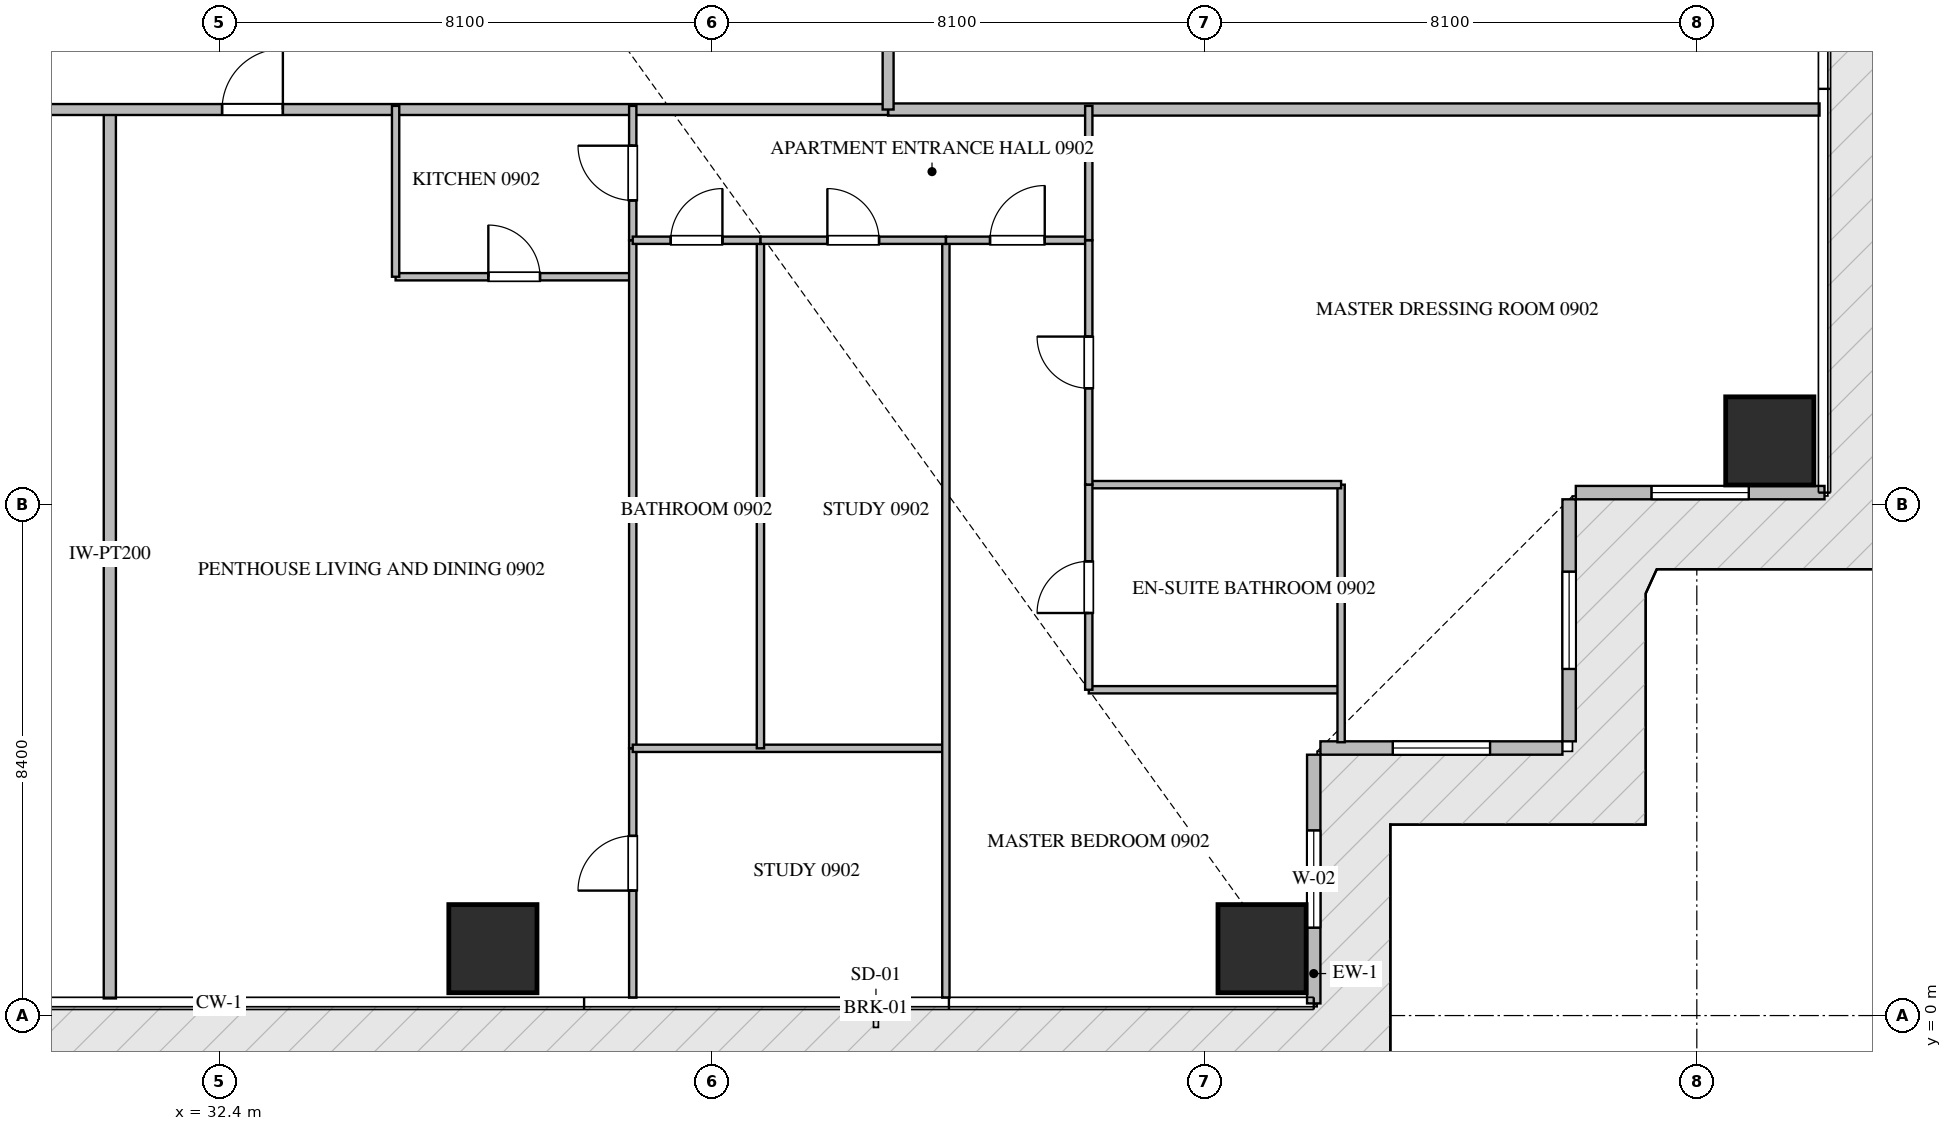
"""IFC4 building model, lengths in metres.
Left out: names, types, materials, properties, quantities, classifications, styles, units other than length and angle.
Written with IfcOpenShell. Run it as: python <this file> out.ifc"""

import sys

from ifc_helpers import new_model, si_unit, direction, frame, frame_2d, origin, origin_2d, place, context, subcontext, project, spatial, rectangle, extrude, source, transform, mapped, element, fill, save


model = new_model("IFC4")
c1 = context("Model", 3, precision=1e-05, world=origin(), true_north=direction((0.0, 1.0)))
c2 = subcontext(c1, "Body", "Model", "MODEL_VIEW")
j1 = project(units=[si_unit("LENGTHUNIT", "METRE"), si_unit("PLANEANGLEUNIT", "RADIAN")], contexts=[c1])
p1 = place(None, origin())
s1 = spatial("IfcSite", under=j1, at=p1, CompositionType="ELEMENT")
p2 = place(p1, origin())
s2 = spatial("IfcBuilding", under=s1, at=p2, CompositionType="ELEMENT")
p3 = place(p2, frame((0.0, 0.0, 41.7)))
s3 = spatial("IfcBuildingStorey", under=s2, at=p3, CompositionType="ELEMENT", Elevation=41.7)
m1 = source(origin(), c2, "Body", "SweptSolid", [
    extrude(rectangle(XDim=1.45, YDim=1.45, at=origin_2d()), origin(), (0.0, 0.0, 1.0), 3.75),
])
for number, where, z_axis, x_axis in (
    (1, (36.9, 1.1, -0.26), (0.0, 0.0, 1.0), (1.0, 0.0, 0.0)),
    (2, (49.55, 1.1, -0.26), (0.0, 0.0, 1.0), (1.0, 0.0, 0.0)),
    (3, (57.9, 9.45, -0.26), (0.0, 0.0, 1.0), (1.0, 0.0, 0.0)),
):
    element("IfcColumn", number, at=place(p3, frame(where, z_axis=z_axis, x_axis=x_axis)), inside=s3, PredefinedType="COLUMN", context=c2, shape_type="MappedRepresentation", body=[
        mapped(m1, transform((0.0, 0.0, 0.0), scale=1.0)),
    ])
p4 = place(p3, frame((50.4, 0.2, 0.0), z_axis=(0.0, 0.0, 1.0), x_axis=(0.0, 1.0, 0.0)))
e4 = element("IfcWall", 4, at=p4, inside=s3, PredefinedType="ELEMENTEDWALL", context=c2, shape_type="SweptSolid", body=[
    extrude(rectangle(XDim=4.09, YDim=0.22, at=frame_2d((2.045, 0.0))), origin(), (0.0, 0.0, 1.0), 3.475),
])
p5 = place(p4, frame((1.245, 0.0, 0.65)))
e5 = element("IfcOpeningElement", 5, at=p5, cuts=e4, PredefinedType="OPENING", context=c2, shape_type="SweptSolid", body=[
    extrude(rectangle(XDim=1.6, YDim=2.1, at=frame_2d((0.8, 1.05))), frame((0.0, 0.12, 0.0), z_axis=(0.0, -1.0, 0.0), x_axis=(1.0, 0.0, 0.0)), (0.0, 0.0, 1.0), 0.24),
])
p6 = place(p3, frame((50.51, 4.4, 0.0), z_axis=(0.0, 0.0, 1.0), x_axis=(1.0, 0.0, 0.0)))
e6 = element("IfcWall", 6, at=p6, inside=s3, PredefinedType="ELEMENTEDWALL", context=c2, shape_type="SweptSolid", body=[
    extrude(rectangle(XDim=3.98, YDim=0.22, at=frame_2d((1.99, 0.0))), origin(), (0.0, 0.0, 1.0), 3.475),
])
p7 = place(p6, frame((1.19, 0.0, 0.65)))
e7 = element("IfcOpeningElement", 7, at=p7, cuts=e6, PredefinedType="OPENING", context=c2, shape_type="SweptSolid", body=[
    extrude(rectangle(XDim=1.6, YDim=2.1, at=frame_2d((0.8, 1.05))), frame((0.0, 0.12, 0.0), z_axis=(0.0, -1.0, 0.0), x_axis=(1.0, 0.0, 0.0)), (0.0, 0.0, 1.0), 0.24),
])
p8 = place(p3, frame((54.6, 4.51, 0.0), z_axis=(0.0, 0.0, 1.0), x_axis=(0.0, 1.0, 0.0)))
e8 = element("IfcWall", 8, at=p8, inside=s3, PredefinedType="ELEMENTEDWALL", context=c2, shape_type="SweptSolid", body=[
    extrude(rectangle(XDim=3.98, YDim=0.22, at=frame_2d((1.99, 0.0))), origin(), (0.0, 0.0, 1.0), 3.475),
])
p9 = place(p8, frame((1.19, 0.0, 0.65)))
e9 = element("IfcOpeningElement", 9, at=p9, cuts=e8, PredefinedType="OPENING", context=c2, shape_type="SweptSolid", body=[
    extrude(rectangle(XDim=1.6, YDim=2.1, at=frame_2d((0.8, 1.05))), frame((0.0, 0.12, 0.0), z_axis=(0.0, -1.0, 0.0), x_axis=(1.0, 0.0, 0.0)), (0.0, 0.0, 1.0), 0.24),
])
p10 = place(p3, frame((54.71, 8.6, 0.0), z_axis=(0.0, 0.0, 1.0), x_axis=(1.0, 0.0, 0.0)))
e10 = element("IfcWall", 10, at=p10, inside=s3, PredefinedType="ELEMENTEDWALL", context=c2, shape_type="SweptSolid", body=[
    extrude(rectangle(XDim=4.09, YDim=0.22, at=frame_2d((2.045, 0.0))), origin(), (0.0, 0.0, 1.0), 3.475),
])
p11 = place(p10, frame((1.245, 0.0, 0.65)))
e11 = element("IfcOpeningElement", 11, at=p11, cuts=e10, PredefinedType="OPENING", context=c2, shape_type="SweptSolid", body=[
    extrude(rectangle(XDim=1.6, YDim=2.1, at=frame_2d((0.8, 1.05))), frame((0.0, 0.12, 0.0), z_axis=(0.0, -1.0, 0.0), x_axis=(1.0, 0.0, 0.0)), (0.0, 0.0, 1.0), 0.24),
])
p12 = place(p3, frame((30.6, 0.282, 0.0), z_axis=(0.0, 0.0, 1.0), x_axis=(0.0, 1.0, 0.0)))
e12 = element("IfcWall", 12, at=p12, inside=s3, PredefinedType="PARTITIONING", context=c2, shape_type="SweptSolid", body=[
    extrude(rectangle(XDim=14.618, YDim=0.2, at=frame_2d((7.309, 0.0))), origin(), (0.0, 0.0, 1.0), 3.49),
])
p13 = place(p3, frame((43.4, 14.9, 0.0), z_axis=(0.0, 0.0, 1.0), x_axis=(1.0, 0.0, 0.0)))
e13 = element("IfcWall", 13, at=p13, inside=s3, PredefinedType="PARTITIONING", context=c2, shape_type="SweptSolid", body=[
    extrude(rectangle(XDim=15.318, YDim=0.2, at=frame_2d((7.659, 0.0))), origin(), (0.0, 0.0, 1.0), 3.49),
])
p14 = place(p3, frame((21.402, 14.9, 0.0), z_axis=(0.0, 0.0, 1.0), x_axis=(1.0, 0.0, 0.0)))
e14 = element("IfcWall", 14, at=p14, inside=s3, PredefinedType="PARTITIONING", context=c2, shape_type="SweptSolid", body=[
    extrude(rectangle(XDim=21.996, YDim=0.18, at=frame_2d((10.998, 0.0))), origin(), (0.0, 0.0, 1.0), 3.49),
])
p15 = place(p14, frame((5.816, 0.0, 0.0)))
e15 = element("IfcOpeningElement", 15, at=p15, cuts=e14, PredefinedType="OPENING", context=c2, shape_type="SweptSolid", body=[
    extrude(rectangle(XDim=1.0, YDim=2.15, at=frame_2d((0.5, 1.075))), frame((0.0, 0.1, 0.0), z_axis=(0.0, -1.0, 0.0), x_axis=(1.0, 0.0, 0.0)), (0.0, 0.0, 1.0), 0.2),
])
p16 = place(p14, frame((11.044, 0.0, 0.0)))
e16 = element("IfcOpeningElement", 16, at=p16, cuts=e14, PredefinedType="OPENING", context=c2, shape_type="SweptSolid", body=[
    extrude(rectangle(XDim=1.0, YDim=2.15, at=frame_2d((0.5, 1.075))), frame((0.0, 0.1, 0.0), z_axis=(0.0, -1.0, 0.0), x_axis=(1.0, 0.0, 0.0)), (0.0, 0.0, 1.0), 0.2),
])
p17 = place(p3, frame((43.4, 14.9, 0.0), z_axis=(0.0, 0.0, 1.0), x_axis=(0.0, 1.0, 0.0)))
e17 = element("IfcWall", 17, at=p17, inside=s3, PredefinedType="PARTITIONING", context=c2, shape_type="SweptSolid", body=[
    extrude(rectangle(XDim=20.6, YDim=0.18, at=frame_2d((10.3, 0.0))), origin(), (0.0, 0.0, 1.0), 3.49),
])
p18 = place(p17, frame((1.96, 0.0, 0.0)))
e18 = element("IfcOpeningElement", 18, at=p18, cuts=e17, PredefinedType="OPENING", context=c2, shape_type="SweptSolid", body=[
    extrude(rectangle(XDim=1.0, YDim=2.15, at=frame_2d((0.5, 1.075))), frame((0.0, 0.1, 0.0), z_axis=(0.0, -1.0, 0.0), x_axis=(1.0, 0.0, 0.0)), (0.0, 0.0, 1.0), 0.2),
])
p19 = place(p3, frame((35.3, 12.15, 0.0), z_axis=(0.0, 0.0, 1.0), x_axis=(1.0, 0.0, 0.0)))
e19 = element("IfcWall", 19, at=p19, inside=s3, PredefinedType="PARTITIONING", context=c2, shape_type="SweptSolid", body=[
    extrude(rectangle(XDim=3.9, YDim=0.12, at=frame_2d((1.95, 0.0))), origin(), (0.0, 0.0, 1.0), 3.49),
])
p20 = place(p19, frame((1.525, 0.0, 0.0)))
e20 = element("IfcOpeningElement", 20, at=p20, cuts=e19, PredefinedType="OPENING", context=c2, shape_type="SweptSolid", body=[
    extrude(rectangle(XDim=0.85, YDim=2.1, at=frame_2d((0.425, 1.05))), frame((0.0, 0.07, 0.0), z_axis=(0.0, -1.0, 0.0), x_axis=(1.0, 0.0, 0.0)), (0.0, 0.0, 1.0), 0.14),
])
p21 = place(p3, frame((35.3, 12.15, 0.0), z_axis=(0.0, 0.0, 1.0), x_axis=(0.0, 1.0, 0.0)))
e21 = element("IfcWall", 21, at=p21, inside=s3, PredefinedType="PARTITIONING", context=c2, shape_type="SweptSolid", body=[
    extrude(rectangle(XDim=2.81, YDim=0.12, at=frame_2d((1.405, 0.0))), origin(), (0.0, 0.0, 1.0), 3.49),
])
p22 = place(p3, frame((39.2, 12.75, 0.0), z_axis=(0.0, 0.0, 1.0), x_axis=(0.0, 1.0, 0.0)))
e22 = element("IfcWall", 22, at=p22, inside=s3, PredefinedType="PARTITIONING", context=c2, shape_type="SweptSolid", body=[
    extrude(rectangle(XDim=2.21, YDim=0.12, at=frame_2d((1.105, 0.0))), origin(), (0.0, 0.0, 1.0), 3.49),
])
p23 = place(p22, frame((0.655, 0.0, 0.0)))
e23 = element("IfcOpeningElement", 23, at=p23, cuts=e22, PredefinedType="OPENING", context=c2, shape_type="SweptSolid", body=[
    extrude(rectangle(XDim=0.9, YDim=2.1, at=frame_2d((0.45, 1.05))), frame((0.0, 0.07, 0.0), z_axis=(0.0, -1.0, 0.0), x_axis=(1.0, 0.0, 0.0)), (0.0, 0.0, 1.0), 0.14),
])
p24 = place(p3, frame((39.2, 0.295, 0.0), z_axis=(0.0, 0.0, 1.0), x_axis=(0.0, 1.0, 0.0)))
e24 = element("IfcWall", 24, at=p24, inside=s3, PredefinedType="PARTITIONING", context=c2, shape_type="SweptSolid", body=[
    extrude(rectangle(XDim=4.1, YDim=0.12, at=frame_2d((2.05, 0.0))), origin(), (0.0, 0.0, 1.0), 3.49),
])
p25 = place(p24, frame((1.76, 0.0, 0.0)))
e25 = element("IfcOpeningElement", 25, at=p25, cuts=e24, PredefinedType="OPENING", context=c2, shape_type="SweptSolid", body=[
    extrude(rectangle(XDim=0.9, YDim=2.1, at=frame_2d((0.45, 1.05))), frame((0.0, 0.07, 0.0), z_axis=(0.0, -1.0, 0.0), x_axis=(1.0, 0.0, 0.0)), (0.0, 0.0, 1.0), 0.14),
])
p26 = place(p3, frame((39.2, 4.397, 0.0), z_axis=(0.0, 0.0, 1.0), x_axis=(0.0, 1.0, 0.0)))
e26 = element("IfcWall", 26, at=p26, inside=s3, PredefinedType="PARTITIONING", context=c2, shape_type="SweptSolid", body=[
    extrude(rectangle(XDim=8.351, YDim=0.12, at=frame_2d((4.176, 0.0))), origin(), (0.0, 0.0, 1.0), 3.49),
])
p27 = place(p3, frame((39.2, 4.395, 0.0), z_axis=(0.0, 0.0, 1.0), x_axis=(1.0, 0.0, 0.0)))
e27 = element("IfcWall", 27, at=p27, inside=s3, PredefinedType="PARTITIONING", context=c2, shape_type="SweptSolid", body=[
    extrude(rectangle(XDim=5.15, YDim=0.12, at=frame_2d((2.575, 0.0))), origin(), (0.0, 0.0, 1.0), 3.49),
])
p28 = place(p3, frame((44.35, 0.295, 0.0), z_axis=(0.0, 0.0, 1.0), x_axis=(0.0, 1.0, 0.0)))
e28 = element("IfcWall", 28, at=p28, inside=s3, PredefinedType="PARTITIONING", context=c2, shape_type="SweptSolid", body=[
    extrude(rectangle(XDim=12.455, YDim=0.12, at=frame_2d((6.228, 0.0))), origin(), (0.0, 0.0, 1.0), 3.49),
])
p29 = place(p3, frame((41.3, 4.395, 0.0), z_axis=(0.0, 0.0, 1.0), x_axis=(0.0, 1.0, 0.0)))
e29 = element("IfcWall", 29, at=p29, inside=s3, PredefinedType="PARTITIONING", context=c2, shape_type="SweptSolid", body=[
    extrude(rectangle(XDim=8.355, YDim=0.12, at=frame_2d((4.177, 0.0))), origin(), (0.0, 0.0, 1.0), 3.49),
])
p30 = place(p3, frame((39.2, 12.75, 0.0), z_axis=(0.0, 0.0, 1.0), x_axis=(1.0, 0.0, 0.0)))
e30 = element("IfcWall", 30, at=p30, inside=s3, PredefinedType="PARTITIONING", context=c2, shape_type="SweptSolid", body=[
    extrude(rectangle(XDim=2.1, YDim=0.12, at=frame_2d((1.05, 0.0))), origin(), (0.0, 0.0, 1.0), 3.49),
])
p31 = place(p30, frame((0.625, 0.0, 0.0)))
e31 = element("IfcOpeningElement", 31, at=p31, cuts=e30, PredefinedType="OPENING", context=c2, shape_type="SweptSolid", body=[
    extrude(rectangle(XDim=0.85, YDim=2.1, at=frame_2d((0.425, 1.05))), frame((0.0, 0.07, 0.0), z_axis=(0.0, -1.0, 0.0), x_axis=(1.0, 0.0, 0.0)), (0.0, 0.0, 1.0), 0.14),
])
p32 = place(p3, frame((41.302, 12.75, 0.0), z_axis=(0.0, 0.0, 1.0), x_axis=(1.0, 0.0, 0.0)))
e32 = element("IfcWall", 32, at=p32, inside=s3, PredefinedType="PARTITIONING", context=c2, shape_type="SweptSolid", body=[
    extrude(rectangle(XDim=3.048, YDim=0.12, at=frame_2d((1.524, 0.0))), origin(), (0.0, 0.0, 1.0), 3.49),
])
p33 = place(p32, frame((1.099, 0.0, 0.0)))
e33 = element("IfcOpeningElement", 33, at=p33, cuts=e32, PredefinedType="OPENING", context=c2, shape_type="SweptSolid", body=[
    extrude(rectangle(XDim=0.85, YDim=2.1, at=frame_2d((0.425, 1.05))), frame((0.0, 0.07, 0.0), z_axis=(0.0, -1.0, 0.0), x_axis=(1.0, 0.0, 0.0)), (0.0, 0.0, 1.0), 0.14),
])
p34 = place(p3, frame((44.352, 12.75, 0.0), z_axis=(0.0, 0.0, 1.0), x_axis=(1.0, 0.0, 0.0)))
e34 = element("IfcWall", 34, at=p34, inside=s3, PredefinedType="PARTITIONING", context=c2, shape_type="SweptSolid", body=[
    extrude(rectangle(XDim=2.348, YDim=0.12, at=frame_2d((1.174, 0.0))), origin(), (0.0, 0.0, 1.0), 3.49),
])
p35 = place(p34, frame((0.724, 0.0, 0.0)))
e35 = element("IfcOpeningElement", 35, at=p35, cuts=e34, PredefinedType="OPENING", context=c2, shape_type="SweptSolid", body=[
    extrude(rectangle(XDim=0.9, YDim=2.1, at=frame_2d((0.45, 1.05))), frame((0.0, 0.07, 0.0), z_axis=(0.0, -1.0, 0.0), x_axis=(1.0, 0.0, 0.0)), (0.0, 0.0, 1.0), 0.14),
])
p36 = place(p3, frame((46.7, 5.358, 0.0), z_axis=(0.0, 0.0, 1.0), x_axis=(1.0, 0.0, 0.0)))
e36 = element("IfcWall", 36, at=p36, inside=s3, PredefinedType="PARTITIONING", context=c2, shape_type="SweptSolid", body=[
    extrude(rectangle(XDim=4.15, YDim=0.12, at=frame_2d((2.075, 0.0))), origin(), (0.0, 0.0, 1.0), 3.49),
])
p37 = place(p3, frame((50.85, 4.495, 0.0), z_axis=(0.0, 0.0, 1.0), x_axis=(0.0, 1.0, 0.0)))
e37 = element("IfcWall", 37, at=p37, inside=s3, PredefinedType="PARTITIONING", context=c2, shape_type="SweptSolid", body=[
    extrude(rectangle(XDim=4.236, YDim=0.12, at=frame_2d((2.118, 0.0))), origin(), (0.0, 0.0, 1.0), 3.49),
])
p38 = place(p3, frame((46.7, 8.731, 0.0), z_axis=(0.0, 0.0, 1.0), x_axis=(1.0, 0.0, 0.0)))
e38 = element("IfcWall", 38, at=p38, inside=s3, PredefinedType="PARTITIONING", context=c2, shape_type="SweptSolid", body=[
    extrude(rectangle(XDim=4.15, YDim=0.12, at=frame_2d((2.075, 0.0))), origin(), (0.0, 0.0, 1.0), 3.49),
])
p39 = place(p3, frame((46.7, 5.358, 0.0), z_axis=(0.0, 0.0, 1.0), x_axis=(0.0, 1.0, 0.0)))
e39 = element("IfcWall", 39, at=p39, inside=s3, PredefinedType="PARTITIONING", context=c2, shape_type="SweptSolid", body=[
    extrude(rectangle(XDim=3.373, YDim=0.12, at=frame_2d((1.687, 0.0))), origin(), (0.0, 0.0, 1.0), 3.49),
])
p40 = place(p39, frame((1.262, 0.0, 0.0)))
e40 = element("IfcOpeningElement", 40, at=p40, cuts=e39, PredefinedType="OPENING", context=c2, shape_type="SweptSolid", body=[
    extrude(rectangle(XDim=0.85, YDim=2.1, at=frame_2d((0.425, 1.05))), frame((0.0, 0.07, 0.0), z_axis=(0.0, -1.0, 0.0), x_axis=(1.0, 0.0, 0.0)), (0.0, 0.0, 1.0), 0.14),
])
p41 = place(p3, frame((46.7, 8.733, 0.0), z_axis=(0.0, 0.0, 1.0), x_axis=(0.0, 1.0, 0.0)))
e41 = element("IfcWall", 41, at=p41, inside=s3, PredefinedType="PARTITIONING", context=c2, shape_type="SweptSolid", body=[
    extrude(rectangle(XDim=4.017, YDim=0.12, at=frame_2d((2.009, 0.0))), origin(), (0.0, 0.0, 1.0), 3.49),
])
p42 = place(p41, frame((1.583, 0.0, 0.0)))
e42 = element("IfcOpeningElement", 42, at=p42, cuts=e41, PredefinedType="OPENING", context=c2, shape_type="SweptSolid", body=[
    extrude(rectangle(XDim=0.85, YDim=2.1, at=frame_2d((0.425, 1.05))), frame((0.0, 0.07, 0.0), z_axis=(0.0, -1.0, 0.0), x_axis=(1.0, 0.0, 0.0)), (0.0, 0.0, 1.0), 0.14),
])
p43 = place(p3, frame((46.7, 12.752, 0.0), z_axis=(0.0, 0.0, 1.0), x_axis=(0.0, 1.0, 0.0)))
e43 = element("IfcWall", 43, at=p43, inside=s3, PredefinedType="PARTITIONING", context=c2, shape_type="SweptSolid", body=[
    extrude(rectangle(XDim=2.208, YDim=0.12, at=frame_2d((1.104, 0.0))), origin(), (0.0, 0.0, 1.0), 3.49),
])
m2 = source(origin(), c2, "Body", "SweptSolid", [
    extrude(rectangle(XDim=1.6, YDim=2.1, at=frame_2d((0.8, 1.05))), frame((0.0, 0.03, 0.0), z_axis=(0.0, -1.0, 0.0), x_axis=(1.0, 0.0, 0.0)), (0.0, 0.0, 1.0), 0.06),
])
p44 = place(p5, origin())
e44 = element("IfcWindow", 44, at=p44, inside=s3, PartitioningType="SINGLE_PANEL", PredefinedType="WINDOW", context=c2, shape_type="MappedRepresentation", body=[
    mapped(m2, transform((0.0, 0.0, 0.0), scale=1.0)),
])
fill(e5, e44)
p45 = place(p7, origin())
e45 = element("IfcWindow", 45, at=p45, inside=s3, PartitioningType="SINGLE_PANEL", PredefinedType="WINDOW", context=c2, shape_type="MappedRepresentation", body=[
    mapped(m2, transform((0.0, 0.0, 0.0), scale=1.0)),
])
fill(e7, e45)
p46 = place(p9, origin())
e46 = element("IfcWindow", 46, at=p46, inside=s3, PartitioningType="SINGLE_PANEL", PredefinedType="WINDOW", context=c2, shape_type="MappedRepresentation", body=[
    mapped(m2, transform((0.0, 0.0, 0.0), scale=1.0)),
])
fill(e9, e46)
p47 = place(p11, origin())
e47 = element("IfcWindow", 47, at=p47, inside=s3, PartitioningType="SINGLE_PANEL", PredefinedType="WINDOW", context=c2, shape_type="MappedRepresentation", body=[
    mapped(m2, transform((0.0, 0.0, 0.0), scale=1.0)),
])
fill(e11, e47)
m3 = source(origin(), c2, "Body", "SweptSolid", [
    extrude(rectangle(XDim=1.0, YDim=2.15, at=frame_2d((0.5, 1.075))), frame((0.0, 0.025, 0.0), z_axis=(0.0, -1.0, 0.0), x_axis=(1.0, 0.0, 0.0)), (0.0, 0.0, 1.0), 0.05),
])
p48 = place(p16, origin())
e48 = element("IfcDoor", 48, at=p48, inside=s3, OperationType="SINGLE_SWING_RIGHT", PredefinedType="DOOR", context=c2, shape_type="MappedRepresentation", body=[
    mapped(m3, transform((0.0, 0.0, 0.0), scale=1.0)),
])
fill(e16, e48)
m4 = source(origin(), c2, "Body", "SweptSolid", [
    extrude(rectangle(XDim=0.85, YDim=2.1, at=frame_2d((0.425, 1.05))), frame((0.0, 0.025, 0.0), z_axis=(0.0, -1.0, 0.0), x_axis=(1.0, 0.0, 0.0)), (0.0, 0.0, 1.0), 0.05),
])
p49 = place(p20, origin())
e49 = element("IfcDoor", 49, at=p49, inside=s3, OperationType="SINGLE_SWING_LEFT", PredefinedType="DOOR", context=c2, shape_type="MappedRepresentation", body=[
    mapped(m4, transform((0.0, 0.0, 0.0), scale=1.0)),
])
fill(e20, e49)
m5 = source(origin(), c2, "Body", "SweptSolid", [
    extrude(rectangle(XDim=0.9, YDim=2.1, at=frame_2d((0.45, 1.05))), frame((0.0, 0.025, 0.0), z_axis=(0.0, -1.0, 0.0), x_axis=(1.0, 0.0, 0.0)), (0.0, 0.0, 1.0), 0.05),
])
p50 = place(p23, origin())
e50 = element("IfcDoor", 50, at=p50, inside=s3, OperationType="SINGLE_SWING_RIGHT", PredefinedType="DOOR", context=c2, shape_type="MappedRepresentation", body=[
    mapped(m5, transform((0.0, 0.0, 0.0), scale=1.0)),
])
fill(e23, e50)
p51 = place(p25, origin())
e51 = element("IfcDoor", 51, at=p51, inside=s3, OperationType="SINGLE_SWING_LEFT", PredefinedType="DOOR", context=c2, shape_type="MappedRepresentation", body=[
    mapped(m5, transform((0.0, 0.0, 0.0), scale=1.0)),
])
fill(e25, e51)
p52 = place(p31, origin())
e52 = element("IfcDoor", 52, at=p52, inside=s3, OperationType="SINGLE_SWING_RIGHT", PredefinedType="DOOR", context=c2, shape_type="MappedRepresentation", body=[
    mapped(m4, transform((0.0, 0.0, 0.0), scale=1.0)),
])
fill(e31, e52)
p53 = place(p33, origin())
e53 = element("IfcDoor", 53, at=p53, inside=s3, OperationType="SINGLE_SWING_LEFT", PredefinedType="DOOR", context=c2, shape_type="MappedRepresentation", body=[
    mapped(m4, transform((0.0, 0.0, 0.0), scale=1.0)),
])
fill(e33, e53)
p54 = place(p35, origin())
e54 = element("IfcDoor", 54, at=p54, inside=s3, OperationType="SINGLE_SWING_RIGHT", PredefinedType="DOOR", context=c2, shape_type="MappedRepresentation", body=[
    mapped(m5, transform((0.0, 0.0, 0.0), scale=1.0)),
])
fill(e35, e54)
p55 = place(p40, origin())
e55 = element("IfcDoor", 55, at=p55, inside=s3, OperationType="SINGLE_SWING_LEFT", PredefinedType="DOOR", context=c2, shape_type="MappedRepresentation", body=[
    mapped(m4, transform((0.0, 0.0, 0.0), scale=1.0)),
])
fill(e40, e55)
p56 = place(p42, origin())
e56 = element("IfcDoor", 56, at=p56, inside=s3, OperationType="SINGLE_SWING_RIGHT", PredefinedType="DOOR", context=c2, shape_type="MappedRepresentation", body=[
    mapped(m4, transform((0.0, 0.0, 0.0), scale=1.0)),
])
fill(e42, e56)
save(model, sys.argv[1])
